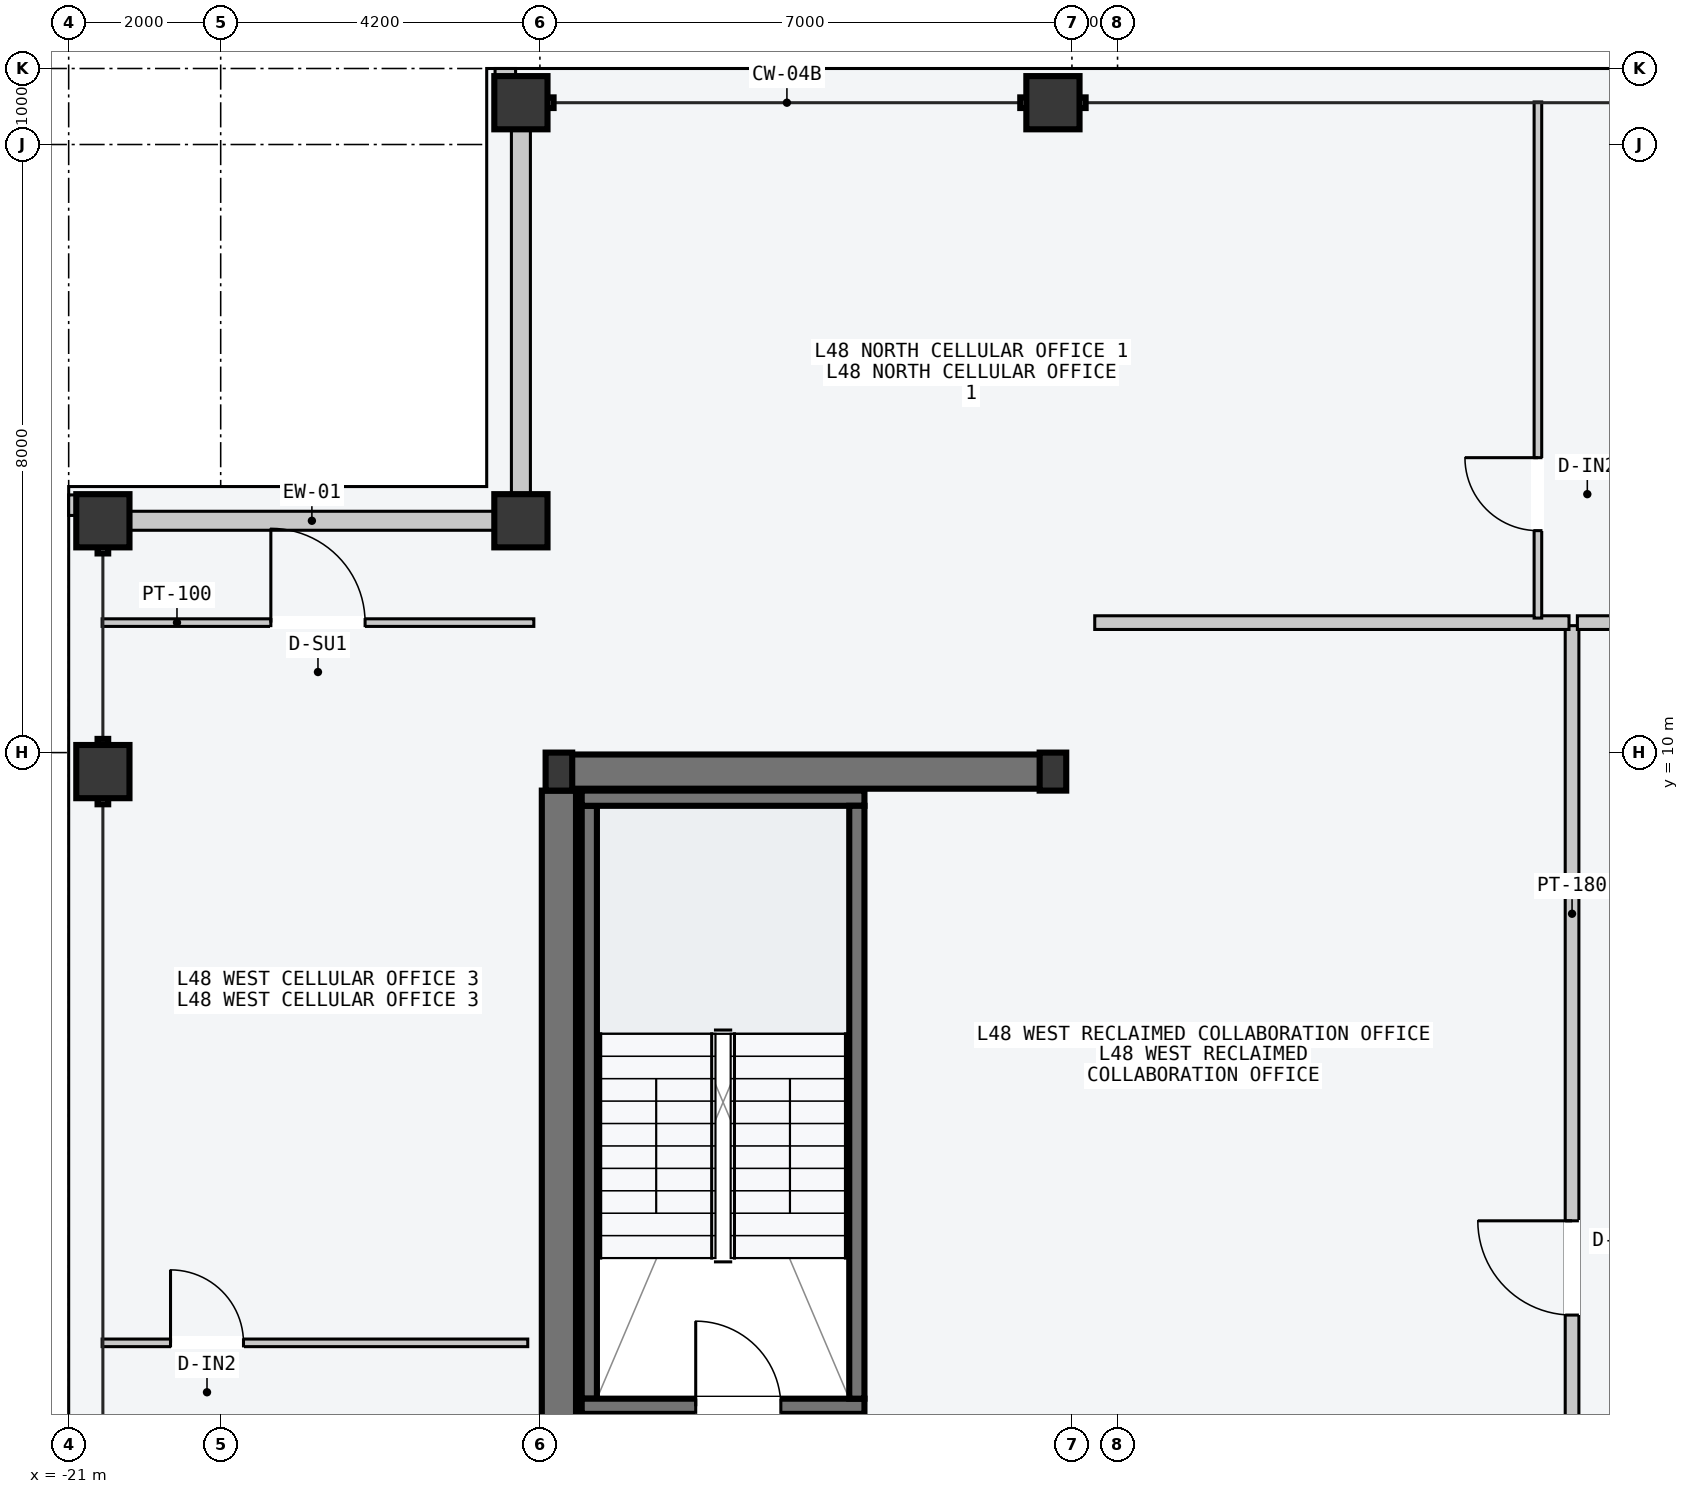
"""IFC4 building model, lengths in metres.
Left out: names, types, materials, properties, quantities, classifications, styles, units other than length and angle.
Written with IfcOpenShell. Run it as: python <this file> out.ifc"""

import sys

from ifc_helpers import new_model, si_unit, direction, frame, frame_2d, origin, origin_2d, place, context, subcontext, project, spatial, rectangle, hollow_rectangle, i_section, extrude, element, fill, save


model = new_model("IFC4")
c1 = context("Model", 3, precision=1e-05, world=origin(), true_north=direction((0.0, 1.0)))
c2 = subcontext(c1, "Body", "Model", "MODEL_VIEW")
j1 = project(units=[si_unit("LENGTHUNIT", "METRE"), si_unit("PLANEANGLEUNIT", "RADIAN")], contexts=[c1])
p1 = place(None, origin())
s1 = spatial("IfcSite", under=j1, at=p1, CompositionType="ELEMENT")
p2 = place(p1, origin())
s2 = spatial("IfcBuilding", under=s1, at=p2, CompositionType="ELEMENT")
p3 = place(p2, frame((0.0, 0.0, 183.9)))
s3 = spatial("IfcBuildingStorey", under=s2, at=p3, CompositionType="ELEMENT", Elevation=183.9)
p4 = place(p3, frame((-14.53, 9.75, -0.2), z_axis=(0.0, 0.0, 1.0), x_axis=(1.0, 0.0, 0.0)))
e1 = element("IfcWall", 1, at=p4, inside=s3, PredefinedType="SHEAR", context=c2, shape_type="SweptSolid", body=[
    extrude(rectangle(XDim=6.46, YDim=0.45, at=frame_2d((3.23, 0.0))), origin(), (0.0, 0.0, 1.0), 3.6),
])
p5 = place(p3, frame((-14.55, 0.25, -0.2), z_axis=(0.0, 0.0, 1.0), x_axis=(0.0, 1.0, 0.0)))
e2 = element("IfcWall", 2, at=p5, inside=s3, PredefinedType="SHEAR", context=c2, shape_type="SweptSolid", body=[
    extrude(rectangle(XDim=9.25, YDim=0.45, at=frame_2d((4.625, 0.0))), origin(), (0.0, 0.0, 1.0), 3.6),
])
p6 = place(p3, frame((-14.15, 1.5, -0.2), z_axis=(0.0, 0.0, 1.0), x_axis=(0.0, 1.0, 0.0)))
e3 = element("IfcWall", 3, at=p6, inside=s3, PredefinedType="SOLIDWALL", context=c2, shape_type="SweptSolid", body=[
    extrude(rectangle(XDim=7.8, YDim=0.2, at=frame_2d((3.9, 0.0))), origin(), (0.0, 0.0, 1.0), 3.6),
])
p7 = place(p3, frame((-14.25, 1.4, -0.2), z_axis=(0.0, 0.0, 1.0), x_axis=(1.0, 0.0, 0.0)))
e4 = element("IfcWall", 4, at=p7, inside=s3, PredefinedType="SOLIDWALL", context=c2, shape_type="SweptSolid", body=[
    extrude(rectangle(XDim=3.72, YDim=0.2, at=frame_2d((1.86, 0.0))), origin(), (0.0, 0.0, 1.0), 3.6),
])
p8 = place(p7, frame((1.5, 0.0, 0.2)))
e5 = element("IfcOpeningElement", 5, at=p8, cuts=e4, PredefinedType="OPENING", context=c2, shape_type="SweptSolid", body=[
    extrude(rectangle(XDim=1.12, YDim=2.18, at=frame_2d((0.56, 1.09))), frame((0.0, 0.11, 0.0), z_axis=(0.0, -1.0, 0.0), x_axis=(1.0, 0.0, 0.0)), (0.0, 0.0, 1.0), 0.22),
])
p9 = place(p3, frame((-14.25, 9.4, -0.2), z_axis=(0.0, 0.0, 1.0), x_axis=(1.0, 0.0, 0.0)))
e6 = element("IfcWall", 6, at=p9, inside=s3, PredefinedType="SOLIDWALL", context=c2, shape_type="SweptSolid", body=[
    extrude(rectangle(XDim=3.72, YDim=0.2, at=frame_2d((1.86, 0.0))), origin(), (0.0, 0.0, 1.0), 3.6),
])
p10 = place(p3, frame((-10.63, 1.5, -0.2), z_axis=(0.0, 0.0, 1.0), x_axis=(0.0, 1.0, 0.0)))
e7 = element("IfcWall", 7, at=p10, inside=s3, PredefinedType="SOLIDWALL", context=c2, shape_type="SweptSolid", body=[
    extrude(rectangle(XDim=7.8, YDim=0.2, at=frame_2d((3.9, 0.0))), origin(), (0.0, 0.0, 1.0), 3.6),
])
for number, where, z_axis, x_axis in (
    (8, (-14.55, 9.75, 0.0), (0.0, 0.0, 1.0), (1.0, 0.0, 0.0)),
    (9, (-8.05, 9.75, 0.0), (0.0, 0.0, 1.0), (1.0, 0.0, 0.0)),
):
    element("IfcColumn", number, at=place(p3, frame(where, z_axis=z_axis, x_axis=x_axis)), inside=s3, PredefinedType="COLUMN", context=c2, shape_type="SweptSolid", body=[
        extrude(i_section(OverallWidth=0.35, OverallDepth=0.5, WebThickness=0.02, FlangeThickness=0.032, at=origin_2d()), origin(), (0.0, 0.0, 1.0), 3.6),
    ])
for number, where, z_axis, x_axis in (
    (10, (-15.05, 18.55, 0.0), (0.0, 0.0, 1.0), (1.0, 0.0, 0.0)),
    (11, (-8.05, 18.55, 0.0), (0.0, 0.0, 1.0), (1.0, 0.0, 0.0)),
    (12, (-20.55, 9.75, 0.0), (0.0, 0.0, 1.0), (0.0, 1.0, 0.0)),
    (13, (-20.55, 13.05, 0.0), (0.0, 0.0, 1.0), (0.0, 1.0, 0.0)),
    (14, (-15.05, 13.05, 0.0), (0.0, 0.0, 1.0), (1.0, 0.0, 0.0)),
):
    element("IfcColumn", number, at=place(p3, frame(where, z_axis=z_axis, x_axis=x_axis)), inside=s3, PredefinedType="COLUMN", context=c2, shape_type="SweptSolid", body=[
        extrude(hollow_rectangle(XDim=0.7, YDim=0.7, WallThickness=0.03, at=origin_2d()), origin(), (0.0, 0.0, 1.0), 3.6),
    ])
for number, where, z_axis, x_axis in (
    (15, (-20.19, 13.05, 0.0), (0.0, 0.0, 1.0), (1.0, 0.0, 0.0)),
    (16, (-15.05, 13.41, 0.0), (0.0, 0.0, 1.0), (0.0, 1.0, 0.0)),
):
    element("IfcWall", number, at=place(p3, frame(where, z_axis=z_axis, x_axis=x_axis)), inside=s3, PredefinedType="STANDARD", context=c2, shape_type="SweptSolid", body=[
        extrude(rectangle(XDim=4.78, YDim=0.25, at=frame_2d((2.39, 0.0))), origin(), (0.0, 0.0, 1.0), 2.75),
    ])
for number, where, z_axis, x_axis in (
    (17, (-15.39, 18.89, 0.0), (0.0, 0.0, 1.0), (1.0, 0.0, 0.0)),
    (18, (-20.89, 13.12, 0.0), (0.0, 0.0, 1.0), (0.0, 1.0, 0.0)),
):
    element("IfcWall", number, at=place(p3, frame(where, z_axis=z_axis, x_axis=x_axis)), inside=s3, PredefinedType="PARAPET", context=c2, shape_type="SweptSolid", body=[
        extrude(rectangle(XDim=0.27, YDim=0.22, at=frame_2d((0.135, 0.0))), origin(), (0.0, 0.0, 1.0), 1.2),
    ])
p11 = place(p3, frame((-1.22, -3.5, 0.0), z_axis=(0.0, 0.0, 1.0), x_axis=(0.0, 1.0, 0.0)))
e19 = element("IfcWall", 19, at=p11, inside=s3, PredefinedType="PARTITIONING", context=c2, shape_type="SweptSolid", body=[
    extrude(rectangle(XDim=15.17, YDim=0.18, at=frame_2d((7.585, 0.0))), origin(), (0.0, 0.0, 1.0), 3.4),
])
p12 = place(p11, frame((6.1, 0.0, 0.0)))
e20 = element("IfcOpeningElement", 20, at=p12, cuts=e19, PredefinedType="OPENING", context=c2, shape_type="SweptSolid", body=[
    extrude(rectangle(XDim=1.24, YDim=2.24, at=frame_2d((0.62, 1.12))), frame((0.0, 0.1, 0.0), z_axis=(0.0, -1.0, 0.0), x_axis=(1.0, 0.0, 0.0)), (0.0, 0.0, 1.0), 0.2),
])
p13 = place(p11, frame((1.6, 0.0, 0.0)))
e21 = element("IfcOpeningElement", 21, at=p13, cuts=e19, PredefinedType="OPENING", context=c2, shape_type="SweptSolid", body=[
    extrude(rectangle(XDim=0.96, YDim=2.18, at=frame_2d((0.48, 1.09))), frame((0.0, 0.1, 0.0), z_axis=(0.0, -1.0, 0.0), x_axis=(1.0, 0.0, 0.0)), (0.0, 0.0, 1.0), 0.2),
])
p14 = place(p3, frame((-7.5, 11.71, 0.0), z_axis=(0.0, 0.0, 1.0), x_axis=(1.0, 0.0, 0.0)))
e22 = element("IfcWall", 22, at=p14, inside=s3, PredefinedType="PARTITIONING", context=c2, shape_type="SweptSolid", body=[
    extrude(rectangle(XDim=6.24, YDim=0.18, at=frame_2d((3.12, 0.0))), origin(), (0.0, 0.0, 1.0), 3.4),
])
p15 = place(p3, frame((-1.669, 11.77, 0.0), z_axis=(0.0, 0.0, 1.0), x_axis=(0.0, 1.0, 0.0)))
e23 = element("IfcWall", 23, at=p15, inside=s3, PredefinedType="PARTITIONING", context=c2, shape_type="SweptSolid", body=[
    extrude(rectangle(XDim=6.79, YDim=0.1, at=frame_2d((3.395, 0.0))), origin(), (0.0, 0.0, 1.0), 3.4),
])
p16 = place(p15, frame((1.15, 0.0, 0.0)))
e24 = element("IfcOpeningElement", 24, at=p16, cuts=e23, PredefinedType="OPENING", context=c2, shape_type="SweptSolid", body=[
    extrude(rectangle(XDim=0.96, YDim=2.18, at=frame_2d((0.48, 1.09))), frame((0.0, 0.06, 0.0), z_axis=(0.0, -1.0, 0.0), x_axis=(1.0, 0.0, 0.0)), (0.0, 0.0, 1.0), 0.12),
])
p17 = place(p3, frame((-1.15, 11.71, 0.0), z_axis=(0.0, 0.0, 1.0), x_axis=(1.0, 0.0, 0.0)))
e25 = element("IfcWall", 25, at=p17, inside=s3, PredefinedType="PARTITIONING", context=c2, shape_type="SweptSolid", body=[
    extrude(rectangle(XDim=2.3, YDim=0.18, at=frame_2d((1.15, 0.0))), origin(), (0.0, 0.0, 1.0), 3.4),
])
p18 = place(p17, frame((0.62, 0.0, 0.0)))
e26 = element("IfcOpeningElement", 26, at=p18, cuts=e25, PredefinedType="OPENING", context=c2, shape_type="SweptSolid", body=[
    extrude(rectangle(XDim=1.06, YDim=2.2, at=frame_2d((0.53, 1.1))), frame((0.0, 0.1, 0.0), z_axis=(0.0, -1.0, 0.0), x_axis=(1.0, 0.0, 0.0)), (0.0, 0.0, 1.0), 0.2),
])
p19 = place(p3, frame((-20.56, 11.71, 0.0), z_axis=(0.0, 0.0, 1.0), x_axis=(1.0, 0.0, 0.0)))
e27 = element("IfcWall", 27, at=p19, inside=s3, PredefinedType="PARTITIONING", context=c2, shape_type="SweptSolid", body=[
    extrude(rectangle(XDim=5.68, YDim=0.1, at=frame_2d((2.84, 0.0))), origin(), (0.0, 0.0, 1.0), 3.4),
])
p20 = place(p19, frame((2.22, 0.0, 0.0)))
e28 = element("IfcOpeningElement", 28, at=p20, cuts=e27, PredefinedType="OPENING", context=c2, shape_type="SweptSolid", body=[
    extrude(rectangle(XDim=1.24, YDim=2.24, at=frame_2d((0.62, 1.12))), frame((0.0, 0.06, 0.0), z_axis=(0.0, -1.0, 0.0), x_axis=(1.0, 0.0, 0.0)), (0.0, 0.0, 1.0), 0.12),
])
p21 = place(p3, frame((-20.56, 2.235, 0.0), z_axis=(0.0, 0.0, 1.0), x_axis=(1.0, 0.0, 0.0)))
e29 = element("IfcWall", 29, at=p21, inside=s3, PredefinedType="PARTITIONING", context=c2, shape_type="SweptSolid", body=[
    extrude(rectangle(XDim=5.6, YDim=0.1, at=frame_2d((2.8, 0.0))), origin(), (0.0, 0.0, 1.0), 3.4),
])
p22 = place(p21, frame((0.9, 0.0, 0.0)))
e30 = element("IfcOpeningElement", 30, at=p22, cuts=e29, PredefinedType="OPENING", context=c2, shape_type="SweptSolid", body=[
    extrude(rectangle(XDim=0.96, YDim=2.18, at=frame_2d((0.48, 1.09))), frame((0.0, 0.06, 0.0), z_axis=(0.0, -1.0, 0.0), x_axis=(1.0, 0.0, 0.0)), (0.0, 0.0, 1.0), 0.12),
])
p23 = place(p8, origin())
e31 = element("IfcDoor", 31, at=p23, inside=s3, OperationType="SINGLE_SWING_LEFT", PredefinedType="DOOR", context=c2, shape_type="SweptSolid", body=[
    extrude(rectangle(XDim=1.12, YDim=2.18, at=frame_2d((0.56, 1.09))), frame((0.0, 0.025, 0.0), z_axis=(0.0, -1.0, 0.0), x_axis=(1.0, 0.0, 0.0)), (0.0, 0.0, 1.0), 0.05),
])
fill(e5, e31)
p24 = place(p12, origin())
e32 = element("IfcDoor", 32, at=p24, inside=s3, OperationType="SINGLE_SWING_RIGHT", PredefinedType="DOOR", context=c2, shape_type="SweptSolid", body=[
    extrude(rectangle(XDim=1.24, YDim=2.24, at=frame_2d((0.62, 1.12))), frame((0.0, 0.025, 0.0), z_axis=(0.0, -1.0, 0.0), x_axis=(1.0, 0.0, 0.0)), (0.0, 0.0, 1.0), 0.05),
])
fill(e20, e32)
p25 = place(p16, origin())
e33 = element("IfcDoor", 33, at=p25, inside=s3, OperationType="SINGLE_SWING_RIGHT", PredefinedType="DOOR", context=c2, shape_type="SweptSolid", body=[
    extrude(rectangle(XDim=0.96, YDim=2.18, at=frame_2d((0.48, 1.09))), frame((0.0, 0.025, 0.0), z_axis=(0.0, -1.0, 0.0), x_axis=(1.0, 0.0, 0.0)), (0.0, 0.0, 1.0), 0.05),
])
fill(e24, e33)
p26 = place(p20, origin())
e34 = element("IfcDoor", 34, at=p26, inside=s3, OperationType="SINGLE_SWING_LEFT", PredefinedType="DOOR", context=c2, shape_type="SweptSolid", body=[
    extrude(rectangle(XDim=1.24, YDim=2.24, at=frame_2d((0.62, 1.12))), frame((0.0, 0.025, 0.0), z_axis=(0.0, -1.0, 0.0), x_axis=(1.0, 0.0, 0.0)), (0.0, 0.0, 1.0), 0.05),
])
fill(e28, e34)
p27 = place(p22, origin())
e35 = element("IfcDoor", 35, at=p27, inside=s3, OperationType="SINGLE_SWING_LEFT", PredefinedType="DOOR", context=c2, shape_type="SweptSolid", body=[
    extrude(rectangle(XDim=0.96, YDim=2.18, at=frame_2d((0.48, 1.09))), frame((0.0, 0.025, 0.0), z_axis=(0.0, -1.0, 0.0), x_axis=(1.0, 0.0, 0.0)), (0.0, 0.0, 1.0), 0.05),
])
fill(e30, e35)
save(model, sys.argv[1])
